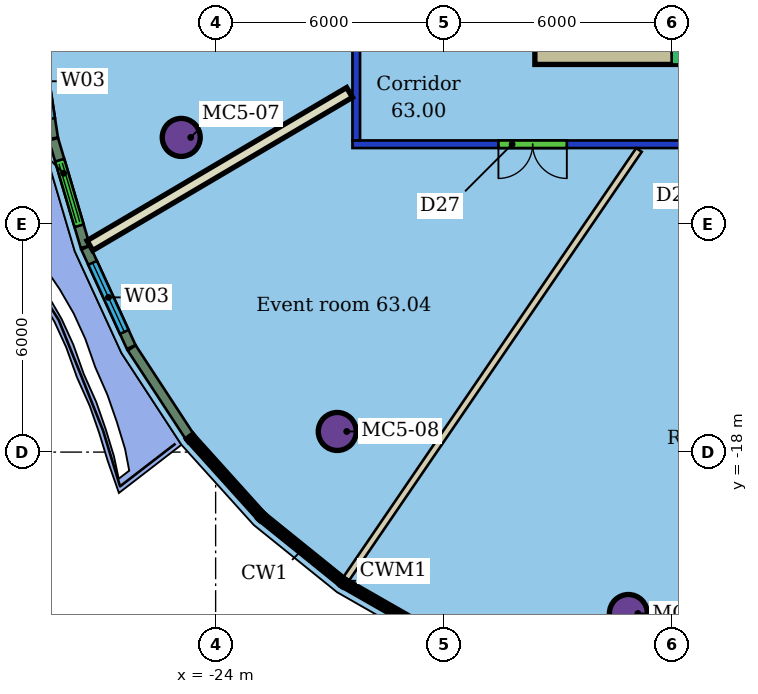
"""IFC4 building model, lengths in metres.
Left out: names, types, materials, properties, quantities, classifications, styles, units other than length and angle.
Written with IfcOpenShell. Run it as: python <this file> out.ifc"""

import sys

from ifc_helpers import new_model, si_unit, direction, frame, frame_2d, origin, origin_2d, place, context, subcontext, project, spatial, rectangle, hollow_circle, extrude, element, fill, save


model = new_model("IFC4")
c1 = context("Model", 3, precision=1e-05, world=origin(), true_north=direction((0.0, 1.0)))
c2 = subcontext(c1, "Body", "Model", "MODEL_VIEW")
j1 = project(units=[si_unit("LENGTHUNIT", "METRE"), si_unit("PLANEANGLEUNIT", "RADIAN")], contexts=[c1])
p1 = place(None, origin())
s1 = spatial("IfcSite", under=j1, at=p1, CompositionType="ELEMENT")
p2 = place(p1, origin())
s2 = spatial("IfcBuilding", under=s1, at=p2, CompositionType="ELEMENT")
p3 = place(p2, frame((0.0, 0.0, 257.7)))
s3 = spatial("IfcBuildingStorey", under=s2, at=p3, CompositionType="ELEMENT", Elevation=257.7)
for number, where, z_axis, x_axis in (
    (1, (-24.906, -9.72, 0.0), (0.0, 0.0, 1.0), (1.0, 0.0, 0.0)),
    (2, (-20.8, -17.457, 0.0), (0.0, 0.0, 1.0), (1.0, 0.0, 0.0)),
    (3, (-13.138, -22.247, 0.0), (0.0, 0.0, 1.0), (1.0, 0.0, 0.0)),
):
    element("IfcColumn", number, at=place(p3, frame(where, z_axis=z_axis, x_axis=x_axis)), inside=s3, PredefinedType="COLUMN", context=c2, shape_type="SweptSolid", body=[
        extrude(hollow_circle(Radius=0.5, WallThickness=0.04, at=origin_2d()), origin(), (0.0, 0.0, 1.0), 3.45),
    ])
p4 = place(p3, frame((8.4, -9.9, 0.0), z_axis=(0.0, 0.0, 1.0), x_axis=(-1.0, 0.0, 0.0)))
e4 = element("IfcWall", 4, at=p4, inside=s3, PredefinedType="PARTITIONING", context=c2, shape_type="SweptSolid", body=[
    extrude(rectangle(XDim=28.8, YDim=0.2, at=frame_2d((14.4, 0.0))), origin(), (0.0, 0.0, 1.0), 3.1),
])
p5 = place(p4, frame((23.159, 0.0, 0.0)))
e5 = element("IfcOpeningElement", 5, at=p5, cuts=e4, PredefinedType="OPENING", context=c2, shape_type="SweptSolid", body=[
    extrude(rectangle(XDim=1.8, YDim=2.4, at=frame_2d((0.9, 1.2))), frame((0.0, 0.11, 0.0), z_axis=(0.0, -1.0, 0.0), x_axis=(1.0, 0.0, 0.0)), (0.0, 0.0, 1.0), 0.22),
])
p6 = place(p4, frame((17.296, 0.0, 0.0)))
e6 = element("IfcOpeningElement", 6, at=p6, cuts=e4, PredefinedType="OPENING", context=c2, shape_type="SweptSolid", body=[
    extrude(rectangle(XDim=1.5, YDim=2.4, at=frame_2d((0.75, 1.2))), frame((0.0, 0.11, 0.0), z_axis=(0.0, -1.0, 0.0), x_axis=(1.0, 0.0, 0.0)), (0.0, 0.0, 1.0), 0.22),
])
p7 = place(p4, frame((8.284, 0.0, 0.0)))
e7 = element("IfcOpeningElement", 7, at=p7, cuts=e4, PredefinedType="OPENING", context=c2, shape_type="SweptSolid", body=[
    extrude(rectangle(XDim=0.9, YDim=2.1, at=frame_2d((0.45, 1.05))), frame((0.0, 0.11, 0.0), z_axis=(0.0, -1.0, 0.0), x_axis=(1.0, 0.0, 0.0)), (0.0, 0.0, 1.0), 0.22),
])
p8 = place(p4, frame((3.497, 0.0, 0.0)))
e8 = element("IfcOpeningElement", 8, at=p8, cuts=e4, PredefinedType="OPENING", context=c2, shape_type="SweptSolid", body=[
    extrude(rectangle(XDim=1.5, YDim=2.1, at=frame_2d((0.75, 1.05))), frame((0.0, 0.11, 0.0), z_axis=(0.0, -1.0, 0.0), x_axis=(1.0, 0.0, 0.0)), (0.0, 0.0, 1.0), 0.22),
])
p9 = place(p3, frame((-20.3, -9.8, 0.0), z_axis=(0.0, 0.0, 1.0), x_axis=(0.0, 1.0, 0.0)))
e9 = element("IfcWall", 9, at=p9, inside=s3, PredefinedType="PARTITIONING", context=c2, shape_type="SweptSolid", body=[
    extrude(rectangle(XDim=19.6, YDim=0.2, at=frame_2d((9.8, 0.0))), origin(), (0.0, 0.0, 1.0), 3.1),
])
p10 = place(p9, frame((13.85, 0.0, 0.0)))
e10 = element("IfcOpeningElement", 10, at=p10, cuts=e9, PredefinedType="OPENING", context=c2, shape_type="SweptSolid", body=[
    extrude(rectangle(XDim=1.5, YDim=2.1, at=frame_2d((0.75, 1.05))), frame((0.0, 0.11, 0.0), z_axis=(0.0, -1.0, 0.0), x_axis=(1.0, 0.0, 0.0)), (0.0, 0.0, 1.0), 0.22),
])
p11 = place(p9, frame((7.092, 0.0, 0.0)))
e11 = element("IfcOpeningElement", 11, at=p11, cuts=e9, PredefinedType="OPENING", context=c2, shape_type="SweptSolid", body=[
    extrude(rectangle(XDim=1.8, YDim=2.4, at=frame_2d((0.9, 1.2))), frame((0.0, 0.11, 0.0), z_axis=(0.0, -1.0, 0.0), x_axis=(1.0, 0.0, 0.0)), (0.0, 0.0, 1.0), 0.22),
])
p12 = place(p3, frame((-27.309, -12.566, 0.0), z_axis=(0.0, 0.0, 1.0), x_axis=(0.861365558052, 0.507985605506, 0.0)))
e12 = element("IfcWall", 12, at=p12, inside=s3, PredefinedType="PARTITIONING", context=c2, shape_type="SweptSolid", body=[
    extrude(rectangle(XDim=7.932, YDim=0.3, at=frame_2d((3.966, 0.0))), origin(), (0.0, 0.0, 1.0), 3.45),
])
p13 = place(p3, frame((-20.565, -21.335, 0.0), z_axis=(0.0, 0.0, 1.0), x_axis=(0.563811273549, 0.825903655289, 0.0)))
e13 = element("IfcWall", 13, at=p13, inside=s3, PredefinedType="PARTITIONING", context=c2, shape_type="SweptSolid", body=[
    extrude(rectangle(XDim=13.665, YDim=0.175, at=frame_2d((6.833, 0.0))), origin(), (0.0, 0.0, 1.0), 3.45),
])
p14 = place(p3, frame((-28.734, -6.742, 0.0), z_axis=(0.0, 0.0, 1.0), x_axis=(0.151930263347, -0.988391215602, 0.0)))
e14 = element("IfcWall", 14, at=p14, inside=s3, PredefinedType="SOLIDWALL", context=c2, shape_type="SweptSolid", body=[
    extrude(rectangle(XDim=3.035, YDim=0.25, at=frame_2d((1.518, 0.0))), origin(), (0.0, 0.0, 1.0), 3.15),
])
p15 = place(p14, frame((0.518, 0.0, 0.9)))
e15 = element("IfcOpeningElement", 15, at=p15, cuts=e14, PredefinedType="OPENING", context=c2, shape_type="SweptSolid", body=[
    extrude(rectangle(XDim=2.0, YDim=2.1, at=frame_2d((1.0, 1.05))), frame((0.0, 0.135, 0.0), z_axis=(0.0, -1.0, 0.0), x_axis=(1.0, 0.0, 0.0)), (0.0, 0.0, 1.0), 0.27),
])
p16 = place(p3, frame((-28.267, -9.767, 0.0), z_axis=(0.0, 0.0, 1.0), x_axis=(0.283795508972, -0.958884825768, 0.0)))
e16 = element("IfcWall", 16, at=p16, inside=s3, PredefinedType="SOLIDWALL", context=c2, shape_type="SweptSolid", body=[
    extrude(rectangle(XDim=2.952, YDim=0.25, at=frame_2d((1.476, 0.0))), origin(), (0.0, 0.0, 1.0), 3.15),
])
p17 = place(p16, frame((0.576, 0.0, 0.0)))
e17 = element("IfcOpeningElement", 17, at=p17, cuts=e16, PredefinedType="OPENING", context=c2, shape_type="SweptSolid", body=[
    extrude(rectangle(XDim=1.8, YDim=2.4, at=frame_2d((0.9, 1.2))), frame((0.0, 0.135, 0.0), z_axis=(0.0, -1.0, 0.0), x_axis=(1.0, 0.0, 0.0)), (0.0, 0.0, 1.0), 0.27),
])
p18 = place(p3, frame((-27.42, -12.622, 0.0), z_axis=(0.0, 0.0, 1.0), x_axis=(0.416844676261, -0.908977731231, 0.0)))
e18 = element("IfcWall", 18, at=p18, inside=s3, PredefinedType="SOLIDWALL", context=c2, shape_type="SweptSolid", body=[
    extrude(rectangle(XDim=2.876, YDim=0.25, at=frame_2d((1.438, 0.0))), origin(), (0.0, 0.0, 1.0), 3.15),
])
p19 = place(p18, frame((0.438, 0.0, 0.9)))
e19 = element("IfcOpeningElement", 19, at=p19, cuts=e18, PredefinedType="OPENING", context=c2, shape_type="SweptSolid", body=[
    extrude(rectangle(XDim=2.0, YDim=2.1, at=frame_2d((1.0, 1.05))), frame((0.0, 0.135, 0.0), z_axis=(0.0, -1.0, 0.0), x_axis=(1.0, 0.0, 0.0)), (0.0, 0.0, 1.0), 0.27),
])
p20 = place(p3, frame((-26.208, -15.26, 0.0), z_axis=(0.0, 0.0, 1.0), x_axis=(0.547256484876, -0.836964957308, 0.0)))
e20 = element("IfcWall", 20, at=p20, inside=s3, PredefinedType="SOLIDWALL", context=c2, shape_type="SweptSolid", body=[
    extrude(rectangle(XDim=2.771, YDim=0.25, at=frame_2d((1.385, 0.0))), origin(), (0.0, 0.0, 1.0), 3.15),
])
p21 = place(p3, frame((-15.6, -7.55, 0.0), z_axis=(0.0, 0.0, 1.0), x_axis=(1.0, 0.0, 0.0)))
e21 = element("IfcWall", 21, at=p21, inside=s3, PredefinedType="SHEAR", context=c2, shape_type="SweptSolid", body=[
    extrude(rectangle(XDim=19.2, YDim=0.5, at=frame_2d((9.6, 0.0))), origin(), (0.0, 0.0, 1.0), 3.3),
])
p22 = place(p21, frame((3.6, 0.0, 0.0)))
e22 = element("IfcOpeningElement", 22, at=p22, cuts=e21, PredefinedType="OPENING", context=c2, shape_type="SweptSolid", body=[
    extrude(rectangle(XDim=1.2, YDim=2.1, at=frame_2d((0.6, 1.05))), frame((0.0, 0.26, 0.0), z_axis=(0.0, -1.0, 0.0), x_axis=(1.0, 0.0, 0.0)), (0.0, 0.0, 1.0), 0.52),
])
p23 = place(p5, origin())
e23 = element("IfcDoor", 23, at=p23, inside=s3, OperationType="DOUBLE_DOOR_SINGLE_SWING", PredefinedType="DOOR", context=c2, shape_type="SweptSolid", body=[
    extrude(rectangle(XDim=1.8, YDim=2.4, at=frame_2d((0.9, 1.2))), frame((0.0, 0.025, 0.0), z_axis=(0.0, -1.0, 0.0), x_axis=(1.0, 0.0, 0.0)), (0.0, 0.0, 1.0), 0.05),
])
fill(e5, e23)
p24 = place(p17, origin())
e24 = element("IfcDoor", 24, at=p24, inside=s3, OperationType="DOUBLE_DOOR_SLIDING", PredefinedType="DOOR", context=c2, shape_type="SweptSolid", body=[
    extrude(rectangle(XDim=1.8, YDim=2.4, at=frame_2d((0.9, 1.2))), frame((0.0, 0.025, 0.0), z_axis=(0.0, -1.0, 0.0), x_axis=(1.0, 0.0, 0.0)), (0.0, 0.0, 1.0), 0.05),
])
fill(e17, e24)
p25 = place(p19, origin())
e25 = element("IfcWindow", 25, at=p25, inside=s3, PartitioningType="SINGLE_PANEL", PredefinedType="WINDOW", context=c2, shape_type="SweptSolid", body=[
    extrude(rectangle(XDim=2.0, YDim=2.1, at=frame_2d((1.0, 1.05))), frame((0.0, 0.03, 0.0), z_axis=(0.0, -1.0, 0.0), x_axis=(1.0, 0.0, 0.0)), (0.0, 0.0, 1.0), 0.06),
])
fill(e19, e25)
p26 = place(p22, origin())
e26 = element("IfcDoor", 26, at=p26, inside=s3, OperationType="DOUBLE_DOOR_SINGLE_SWING", PredefinedType="NOTDEFINED", context=c2, shape_type="SweptSolid", body=[
    extrude(rectangle(XDim=1.2, YDim=2.1, at=frame_2d((0.6, 1.05))), frame((0.0, 0.025, 0.0), z_axis=(0.0, -1.0, 0.0), x_axis=(1.0, 0.0, 0.0)), (0.0, 0.0, 1.0), 0.05),
])
fill(e22, e26)
save(model, sys.argv[1])
